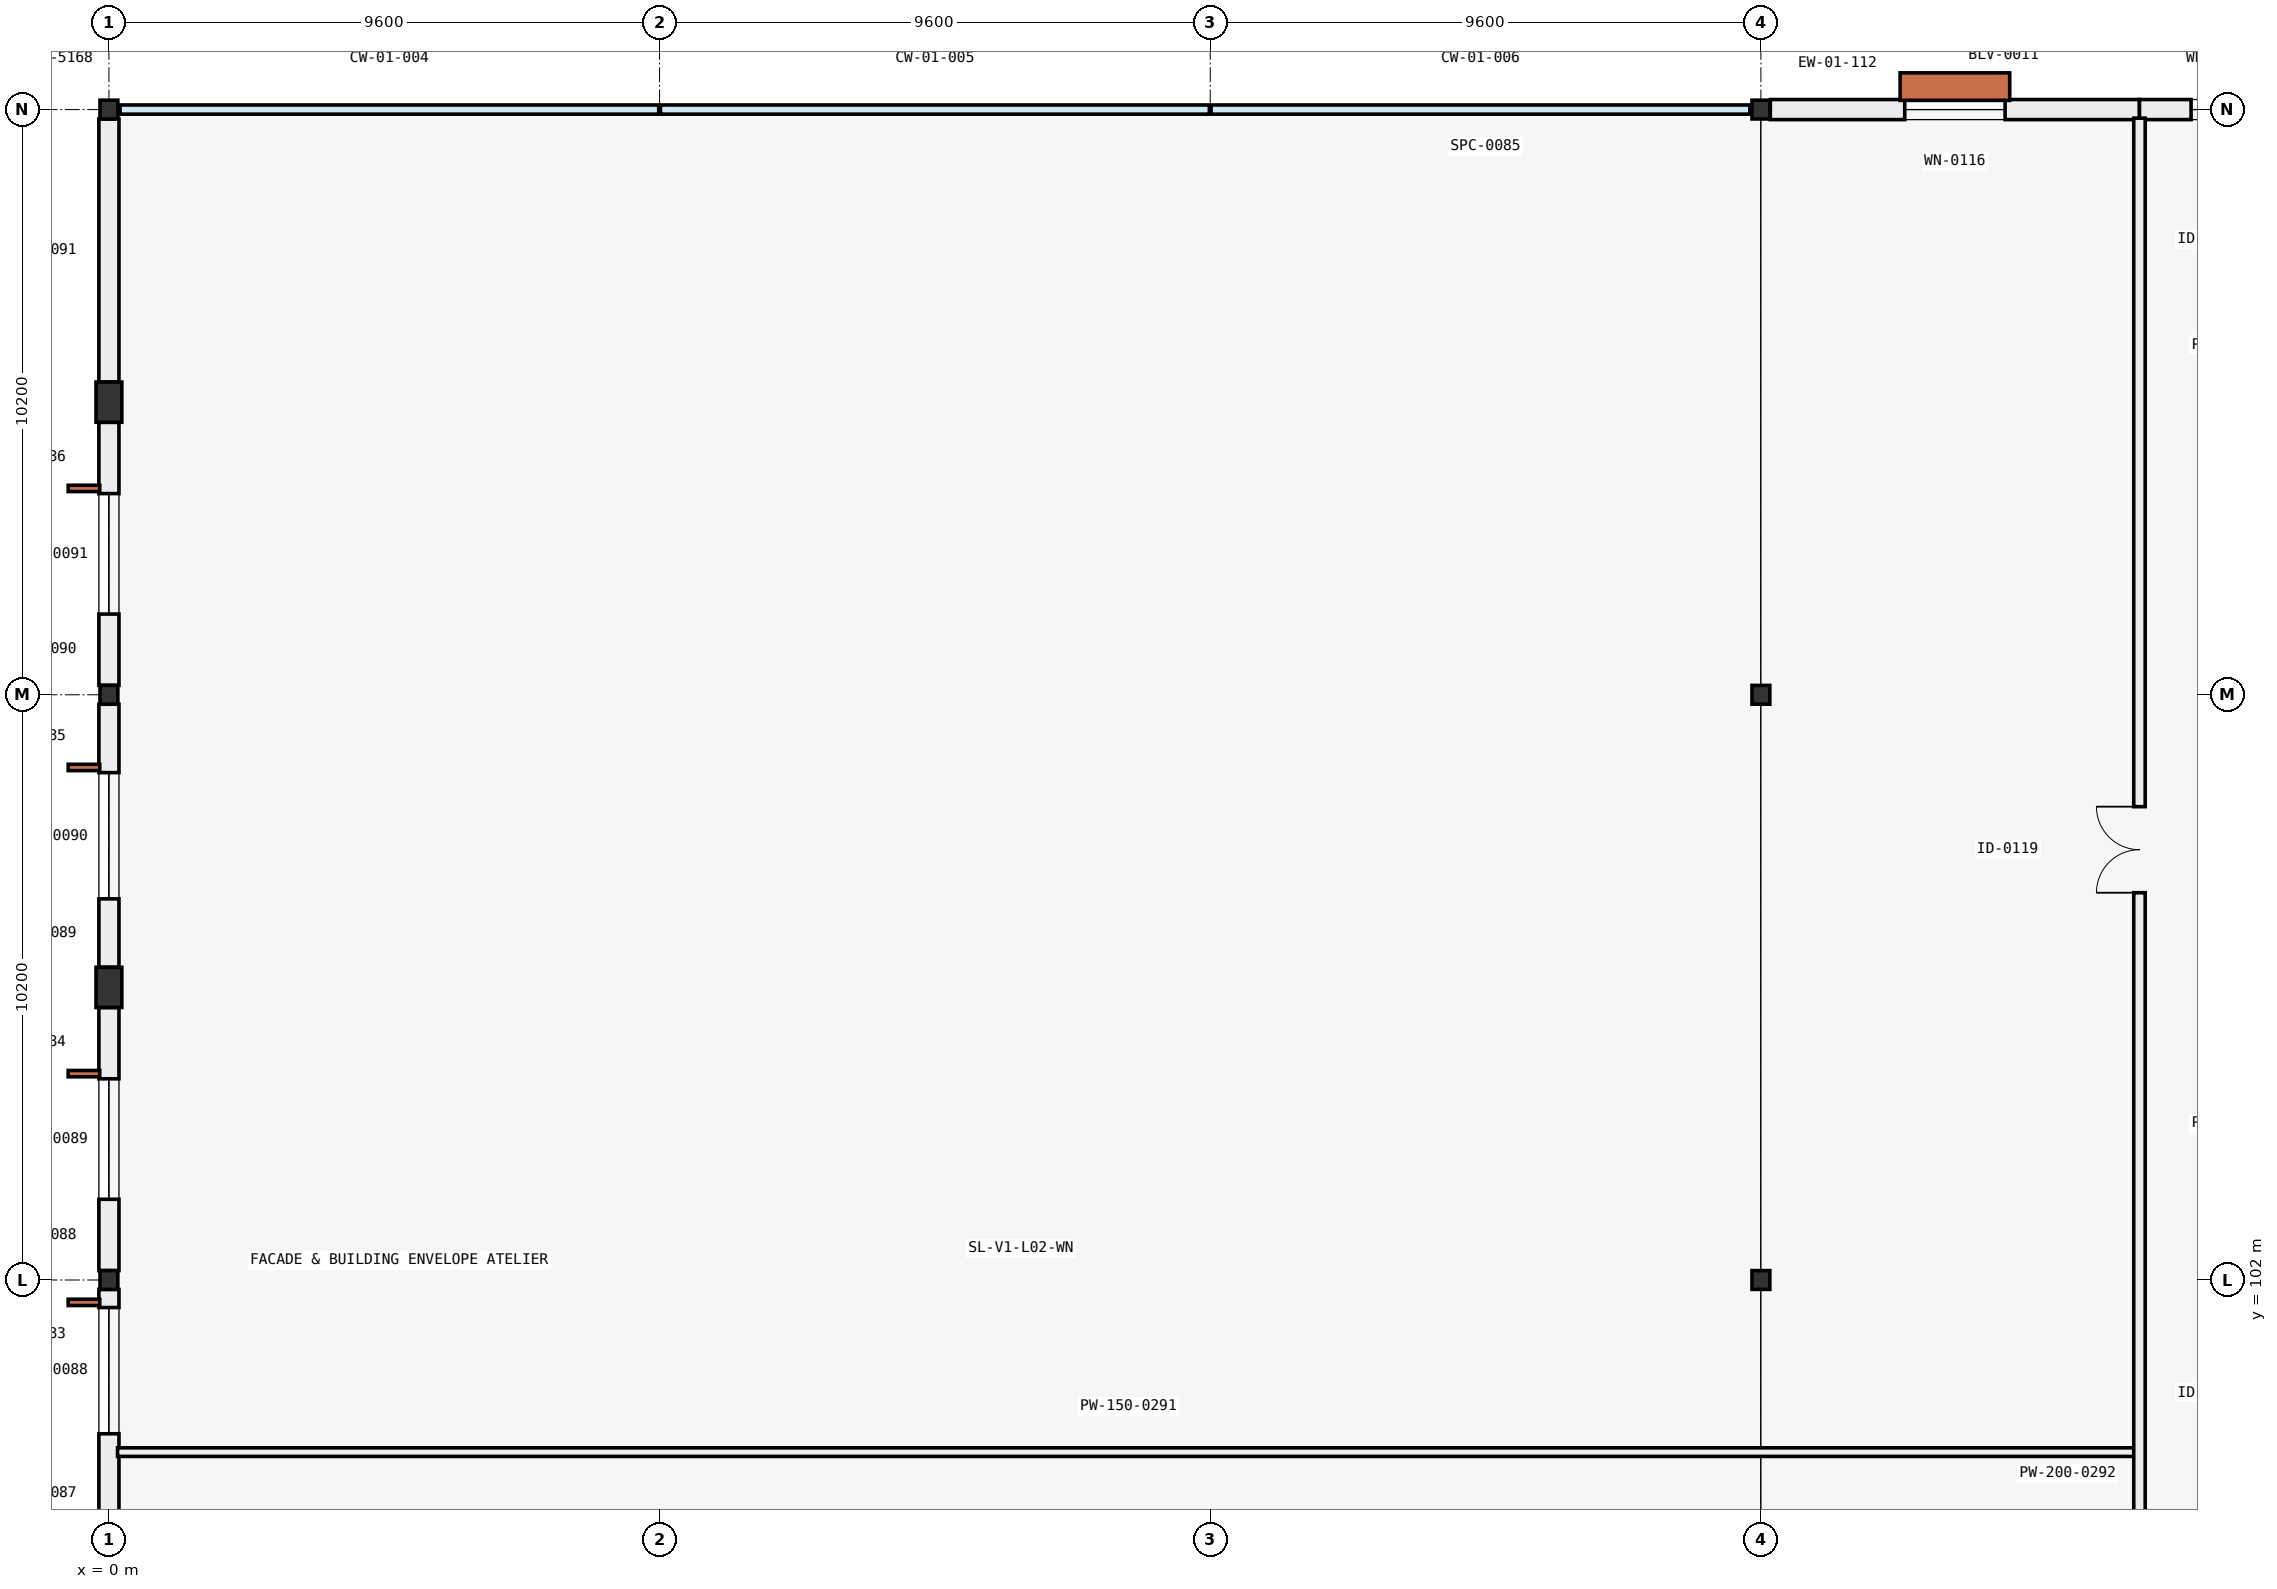
"""IFC4 building model, lengths in metres.
Left out: names, types, materials, properties, quantities, classifications, styles, units other than length and angle.
Written with IfcOpenShell. Run it as: python <this file> out.ifc"""

import sys

from ifc_helpers import new_model, si_unit, direction, frame, frame_2d, origin, origin_2d, place, context, subcontext, project, spatial, rectangle, i_section, extrude, element, fill, save


model = new_model("IFC4")
c1 = context("Model", 3, precision=1e-05, world=origin(), true_north=direction((0.0, 1.0)))
c2 = subcontext(c1, "Body", "Model", "MODEL_VIEW")
j1 = project(units=[si_unit("LENGTHUNIT", "METRE"), si_unit("PLANEANGLEUNIT", "RADIAN")], contexts=[c1])
p1 = place(None, origin())
s1 = spatial("IfcSite", under=j1, at=p1, CompositionType="ELEMENT")
p2 = place(p1, origin())
s2 = spatial("IfcBuilding", under=s1, at=p2, CompositionType="ELEMENT")
p3 = place(p2, frame((0.0, 0.0, 9.6)))
s3 = spatial("IfcBuildingStorey", under=s2, at=p3, CompositionType="ELEMENT", Elevation=9.6)
for number, where, z_axis, x_axis in (
    (1, (0.0, 102.0, 0.0), (0.0, 0.0, 1.0), (1.0, 0.0, 0.0)),
    (2, (28.8, 102.0, 0.0), (0.0, 0.0, 1.0), (1.0, 0.0, 0.0)),
    (3, (0.0, 112.2, 0.0), (0.0, 0.0, 1.0), (1.0, 0.0, 0.0)),
    (4, (28.8, 112.2, 0.0), (0.0, 0.0, 1.0), (1.0, 0.0, 0.0)),
    (5, (0.0, 122.4, 0.0), (0.0, 0.0, 1.0), (1.0, 0.0, 0.0)),
    (6, (28.8, 122.4, 0.0), (0.0, 0.0, 1.0), (1.0, 0.0, 0.0)),
):
    element("IfcColumn", number, at=place(p3, frame(where, z_axis=z_axis, x_axis=x_axis)), inside=s3, PredefinedType="COLUMN", context=c2, shape_type="SweptSolid", body=[
        extrude(i_section(OverallWidth=0.311, OverallDepth=0.327, WebThickness=0.016, FlangeThickness=0.025, FilletRadius=0.017, at=origin_2d()), origin(), (0.0, 0.0, 1.0), 4.2),
    ])
for number, where, z_axis, x_axis in (
    (7, (0.0, 107.1, 0.0), (0.0, 0.0, 1.0), (1.0, 0.0, 0.0)),
    (8, (0.0, 117.3, 0.0), (0.0, 0.0, 1.0), (1.0, 0.0, 0.0)),
):
    element("IfcColumn", number, at=place(p3, frame(where, z_axis=z_axis, x_axis=x_axis)), inside=s3, PredefinedType="PILASTER", context=c2, shape_type="SweptSolid", body=[
        extrude(rectangle(XDim=0.45, YDim=0.7, at=origin_2d()), origin(), (0.0, 0.0, 1.0), 4.2),
    ])
p4 = place(p3, frame((0.0, 97.251, 0.0), z_axis=(0.0, 0.0, 1.0), x_axis=(0.0, 1.0, 0.0)))
e9 = element("IfcWall", 9, at=p4, inside=s3, PredefinedType="SOLIDWALL", context=c2, shape_type="SweptSolid", body=[
    extrude(rectangle(XDim=4.584, YDim=0.35, at=frame_2d((2.292, 0.0))), origin(), (0.0, 0.0, 1.0), 3.48),
])
p5 = place(p4, frame((2.069, 0.0, 0.85)))
e10 = element("IfcOpeningElement", 10, at=p5, cuts=e9, PredefinedType="OPENING", context=c2, shape_type="SweptSolid", body=[
    extrude(rectangle(XDim=2.2, YDim=2.3, at=frame_2d((1.1, 1.15))), frame((0.0, 0.185, 0.0), z_axis=(0.0, -1.0, 0.0), x_axis=(1.0, 0.0, 0.0)), (0.0, 0.0, 1.0), 0.37),
])
p6 = place(p3, frame((0.0, 102.165, 0.0), z_axis=(0.0, 0.0, 1.0), x_axis=(0.0, 1.0, 0.0)))
e11 = element("IfcWall", 11, at=p6, inside=s3, PredefinedType="SOLIDWALL", context=c2, shape_type="SweptSolid", body=[
    extrude(rectangle(XDim=4.584, YDim=0.35, at=frame_2d((2.292, 0.0))), origin(), (0.0, 0.0, 1.0), 3.48),
])
p7 = place(p6, frame((1.242, 0.0, 0.85)))
e12 = element("IfcOpeningElement", 12, at=p7, cuts=e11, PredefinedType="OPENING", context=c2, shape_type="SweptSolid", body=[
    extrude(rectangle(XDim=2.1, YDim=2.4, at=frame_2d((1.05, 1.2))), frame((0.0, 0.185, 0.0), z_axis=(0.0, -1.0, 0.0), x_axis=(1.0, 0.0, 0.0)), (0.0, 0.0, 1.0), 0.37),
])
p8 = place(p3, frame((0.0, 107.451, 0.0), z_axis=(0.0, 0.0, 1.0), x_axis=(0.0, 1.0, 0.0)))
e13 = element("IfcWall", 13, at=p8, inside=s3, PredefinedType="SOLIDWALL", context=c2, shape_type="SweptSolid", body=[
    extrude(rectangle(XDim=4.584, YDim=0.35, at=frame_2d((2.292, 0.0))), origin(), (0.0, 0.0, 1.0), 3.48),
])
p9 = place(p8, frame((1.192, 0.0, 0.85)))
e14 = element("IfcOpeningElement", 14, at=p9, cuts=e13, PredefinedType="OPENING", context=c2, shape_type="SweptSolid", body=[
    extrude(rectangle(XDim=2.2, YDim=2.3, at=frame_2d((1.1, 1.15))), frame((0.0, 0.185, 0.0), z_axis=(0.0, -1.0, 0.0), x_axis=(1.0, 0.0, 0.0)), (0.0, 0.0, 1.0), 0.37),
])
p10 = place(p3, frame((0.0, 112.365, 0.0), z_axis=(0.0, 0.0, 1.0), x_axis=(0.0, 1.0, 0.0)))
e15 = element("IfcWall", 15, at=p10, inside=s3, PredefinedType="SOLIDWALL", context=c2, shape_type="SweptSolid", body=[
    extrude(rectangle(XDim=4.584, YDim=0.35, at=frame_2d((2.292, 0.0))), origin(), (0.0, 0.0, 1.0), 3.48),
])
p11 = place(p10, frame((1.242, 0.0, 0.85)))
e16 = element("IfcOpeningElement", 16, at=p11, cuts=e15, PredefinedType="OPENING", context=c2, shape_type="SweptSolid", body=[
    extrude(rectangle(XDim=2.1, YDim=2.4, at=frame_2d((1.05, 1.2))), frame((0.0, 0.185, 0.0), z_axis=(0.0, -1.0, 0.0), x_axis=(1.0, 0.0, 0.0)), (0.0, 0.0, 1.0), 0.37),
])
p12 = place(p3, frame((0.0, 117.651, 0.0), z_axis=(0.0, 0.0, 1.0), x_axis=(0.0, 1.0, 0.0)))
e17 = element("IfcWall", 17, at=p12, inside=s3, PredefinedType="SOLIDWALL", context=c2, shape_type="SweptSolid", body=[
    extrude(rectangle(XDim=4.585, YDim=0.35, at=frame_2d((2.292, 0.0))), origin(), (0.0, 0.0, 1.0), 3.48),
])
p13 = place(p3, frame((28.965, 122.4, 0.0), z_axis=(0.0, 0.0, 1.0), x_axis=(1.0, 0.0, 0.0)))
e18 = element("IfcWall", 18, at=p13, inside=s3, PredefinedType="SOLIDWALL", context=c2, shape_type="SweptSolid", body=[
    extrude(rectangle(XDim=6.435, YDim=0.35, at=frame_2d((3.218, 0.0))), origin(), (0.0, 0.0, 1.0), 3.32),
])
p14 = place(p13, frame((2.343, 0.0, 0.9)))
e19 = element("IfcOpeningElement", 19, at=p14, cuts=e18, PredefinedType="OPENING", context=c2, shape_type="SweptSolid", body=[
    extrude(rectangle(XDim=1.75, YDim=2.05, at=frame_2d((0.875, 1.025))), frame((0.0, 0.185, 0.0), z_axis=(0.0, -1.0, 0.0), x_axis=(1.0, 0.0, 0.0)), (0.0, 0.0, 1.0), 0.37),
])
p15 = place(p3, frame((35.4, 122.4, 0.0), z_axis=(0.0, 0.0, 1.0), x_axis=(1.0, 0.0, 0.0)))
e20 = element("IfcWall", 20, at=p15, inside=s3, PredefinedType="SOLIDWALL", context=c2, shape_type="SweptSolid", body=[
    extrude(rectangle(XDim=2.699, YDim=0.35, at=frame_2d((1.35, 0.0))), origin(), (0.0, 0.0, 1.0), 3.32),
])
p16 = place(p15, frame((0.899, 0.0, 0.85)))
e21 = element("IfcOpeningElement", 21, at=p16, cuts=e20, PredefinedType="OPENING", context=c2, shape_type="SweptSolid", body=[
    extrude(rectangle(XDim=0.9, YDim=2.2, at=frame_2d((0.45, 1.1))), frame((0.0, 0.185, 0.0), z_axis=(0.0, -1.0, 0.0), x_axis=(1.0, 0.0, 0.0)), (0.0, 0.0, 1.0), 0.37),
])
p17 = place(p3, frame((0.15, 99.0, 0.0), z_axis=(0.0, 0.0, 1.0), x_axis=(1.0, 0.0, 0.0)))
e22 = element("IfcWall", 22, at=p17, inside=s3, PredefinedType="PARTITIONING", context=c2, shape_type="SweptSolid", body=[
    extrude(rectangle(XDim=35.25, YDim=0.15, at=frame_2d((17.625, 0.0))), origin(), (0.0, 0.0, 1.0), 3.48),
])
p18 = place(p3, frame((35.4, 51.15, 0.0), z_axis=(0.0, 0.0, 1.0), x_axis=(0.0, 1.0, 0.0)))
e23 = element("IfcWall", 23, at=p18, inside=s3, PredefinedType="PARTITIONING", context=c2, shape_type="SweptSolid", body=[
    extrude(rectangle(XDim=71.1, YDim=0.2, at=frame_2d((35.55, 0.0))), origin(), (0.0, 0.0, 1.0), 3.61),
])
p19 = place(p18, frame((13.85, 0.0, 0.0)))
e24 = element("IfcOpeningElement", 24, at=p19, cuts=e23, PredefinedType="OPENING", context=c2, shape_type="SweptSolid", body=[
    extrude(rectangle(XDim=1.5, YDim=2.2, at=frame_2d((0.75, 1.1))), frame((0.0, 0.11, 0.0), z_axis=(0.0, -1.0, 0.0), x_axis=(1.0, 0.0, 0.0)), (0.0, 0.0, 1.0), 0.22),
])
p20 = place(p18, frame((35.35, 0.0, 0.0)))
e25 = element("IfcOpeningElement", 25, at=p20, cuts=e23, PredefinedType="OPENING", context=c2, shape_type="SweptSolid", body=[
    extrude(rectangle(XDim=2.0, YDim=2.4, at=frame_2d((1.0, 1.2))), frame((0.0, 0.11, 0.0), z_axis=(0.0, -1.0, 0.0), x_axis=(1.0, 0.0, 0.0)), (0.0, 0.0, 1.0), 0.22),
])
p21 = place(p18, frame((57.6, 0.0, 0.0)))
e26 = element("IfcOpeningElement", 26, at=p21, cuts=e23, PredefinedType="OPENING", context=c2, shape_type="SweptSolid", body=[
    extrude(rectangle(XDim=1.5, YDim=2.2, at=frame_2d((0.75, 1.1))), frame((0.0, 0.11, 0.0), z_axis=(0.0, -1.0, 0.0), x_axis=(1.0, 0.0, 0.0)), (0.0, 0.0, 1.0), 0.22),
])
p22 = place(p5, origin())
e27 = element("IfcWindow", 27, at=p22, inside=s3, PartitioningType="SINGLE_PANEL", PredefinedType="WINDOW", context=c2, shape_type="SweptSolid", body=[
    extrude(rectangle(XDim=2.2, YDim=2.3, at=frame_2d((1.1, 1.15))), frame((0.0, 0.03, 0.0), z_axis=(0.0, -1.0, 0.0), x_axis=(1.0, 0.0, 0.0)), (0.0, 0.0, 1.0), 0.06),
])
fill(e10, e27)
p23 = place(p7, origin())
e28 = element("IfcWindow", 28, at=p23, inside=s3, PartitioningType="SINGLE_PANEL", PredefinedType="WINDOW", context=c2, shape_type="SweptSolid", body=[
    extrude(rectangle(XDim=2.1, YDim=2.4, at=frame_2d((1.05, 1.2))), frame((0.0, 0.03, 0.0), z_axis=(0.0, -1.0, 0.0), x_axis=(1.0, 0.0, 0.0)), (0.0, 0.0, 1.0), 0.06),
])
fill(e12, e28)
p24 = place(p9, origin())
e29 = element("IfcWindow", 29, at=p24, inside=s3, PartitioningType="SINGLE_PANEL", PredefinedType="WINDOW", context=c2, shape_type="SweptSolid", body=[
    extrude(rectangle(XDim=2.2, YDim=2.3, at=frame_2d((1.1, 1.15))), frame((0.0, 0.03, 0.0), z_axis=(0.0, -1.0, 0.0), x_axis=(1.0, 0.0, 0.0)), (0.0, 0.0, 1.0), 0.06),
])
fill(e14, e29)
p25 = place(p11, origin())
e30 = element("IfcWindow", 30, at=p25, inside=s3, PartitioningType="SINGLE_PANEL", PredefinedType="WINDOW", context=c2, shape_type="SweptSolid", body=[
    extrude(rectangle(XDim=2.1, YDim=2.4, at=frame_2d((1.05, 1.2))), frame((0.0, 0.03, 0.0), z_axis=(0.0, -1.0, 0.0), x_axis=(1.0, 0.0, 0.0)), (0.0, 0.0, 1.0), 0.06),
])
fill(e16, e30)
p26 = place(p14, origin())
e31 = element("IfcWindow", 31, at=p26, inside=s3, PartitioningType="SINGLE_PANEL", PredefinedType="WINDOW", context=c2, shape_type="SweptSolid", body=[
    extrude(rectangle(XDim=1.75, YDim=2.05, at=frame_2d((0.875, 1.025))), frame((0.0, 0.03, 0.0), z_axis=(0.0, -1.0, 0.0), x_axis=(1.0, 0.0, 0.0)), (0.0, 0.0, 1.0), 0.06),
])
fill(e19, e31)
p27 = place(p16, origin())
e32 = element("IfcWindow", 32, at=p27, inside=s3, PartitioningType="SINGLE_PANEL", PredefinedType="WINDOW", context=c2, shape_type="SweptSolid", body=[
    extrude(rectangle(XDim=0.9, YDim=2.2, at=frame_2d((0.45, 1.1))), frame((0.0, 0.03, 0.0), z_axis=(0.0, -1.0, 0.0), x_axis=(1.0, 0.0, 0.0)), (0.0, 0.0, 1.0), 0.06),
])
fill(e21, e32)
p28 = place(p21, origin())
e33 = element("IfcDoor", 33, at=p28, inside=s3, OperationType="DOUBLE_DOOR_SINGLE_SWING", PredefinedType="DOOR", context=c2, shape_type="SweptSolid", body=[
    extrude(rectangle(XDim=1.5, YDim=2.2, at=frame_2d((0.75, 1.1))), frame((0.0, 0.025, 0.0), z_axis=(0.0, -1.0, 0.0), x_axis=(1.0, 0.0, 0.0)), (0.0, 0.0, 1.0), 0.05),
])
fill(e26, e33)
save(model, sys.argv[1])
